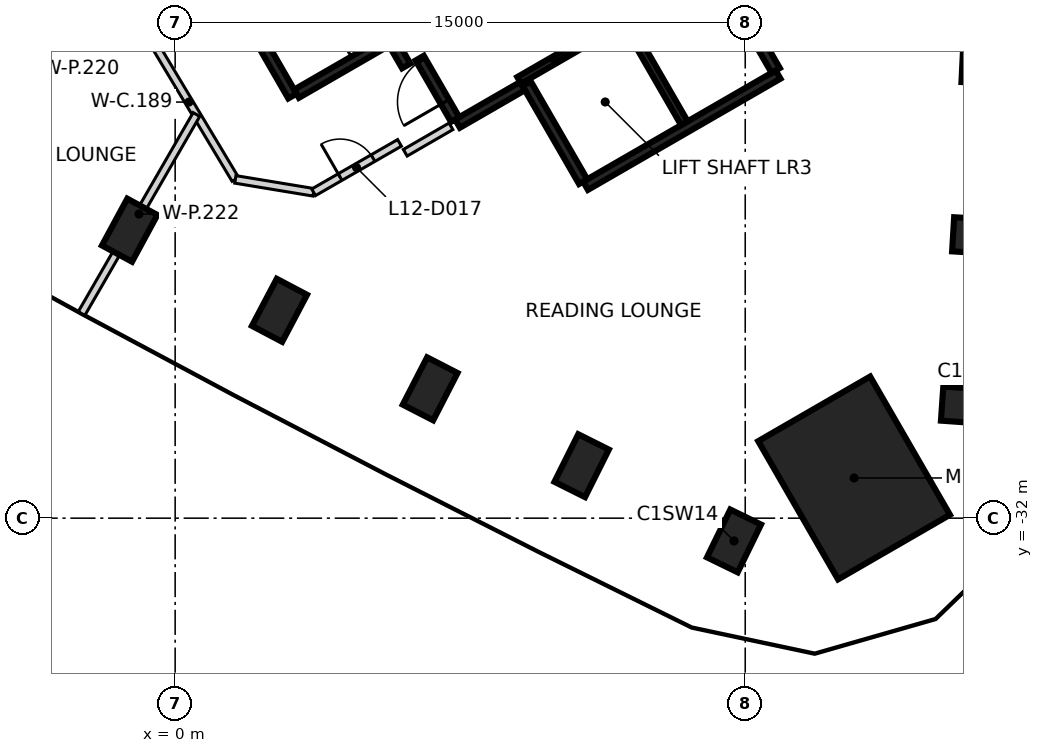
"""IFC4 building model, lengths in metres.
Left out: names, types, materials, properties, quantities, classifications, styles, units other than length and angle.
Written with IfcOpenShell. Run it as: python <this file> out.ifc"""

import sys

from ifc_helpers import new_model, si_unit, direction, frame, frame_2d, origin, origin_2d, place, context, subcontext, project, spatial, rectangle, extrude, element, fill, save


model = new_model("IFC4")
c1 = context("Model", 3, precision=1e-05, world=origin(), true_north=direction((0.0, 1.0)))
c2 = subcontext(c1, "Body", "Model", "MODEL_VIEW")
j1 = project(units=[si_unit("LENGTHUNIT", "METRE"), si_unit("PLANEANGLEUNIT", "RADIAN")], contexts=[c1])
p1 = place(None, origin())
s1 = spatial("IfcSite", under=j1, at=p1, CompositionType="ELEMENT")
p2 = place(p1, origin())
s2 = spatial("IfcBuilding", under=s1, at=p2, CompositionType="ELEMENT")
p3 = place(p2, frame((0.0, 0.0, 56.6)))
s3 = spatial("IfcBuildingStorey", under=s2, at=p3, CompositionType="ELEMENT", Elevation=56.6)
for number, where, z_axis, x_axis in (
    (1, (20.879, -29.034, -0.475), (0.0, 0.0, 1.0), (-0.998, 0.07, 0.0)),
    (2, (21.169, -24.573, -0.475), (0.0, 0.0, 1.0), (-0.998, 0.06, 0.0)),
    (3, (21.41, -20.109, -0.475), (0.0, 0.0, 1.0), (-0.999, 0.048, 0.0)),
    (4, (-1.197, -24.423, -0.475), (0.0, 0.0, 1.0), (0.476, 0.879, 0.0)),
    (5, (2.745, -26.531, -0.475), (0.0, 0.0, 1.0), (0.467, 0.884, 0.0)),
    (6, (6.71, -28.596, -0.475), (0.0, 0.0, 1.0), (0.458, 0.889, 0.0)),
    (7, (10.696, -30.619, -0.475), (0.0, 0.0, 1.0), (0.447, 0.894, 0.0)),
    (8, (14.705, -32.599, -0.475), (0.0, 0.0, 1.0), (0.438, 0.899, 0.0)),
):
    element("IfcColumn", number, at=place(p3, frame(where, z_axis=z_axis, x_axis=x_axis)), inside=s3, PredefinedType="COLUMN", context=c2, shape_type="SweptSolid", body=[
        extrude(rectangle(XDim=1.4, YDim=0.9, at=origin_2d()), origin(), (0.0, 0.0, 1.0), 3.6),
    ])
p4 = place(p3, frame((17.865, -30.942, -0.475), z_axis=(0.0, 0.0, 1.0), x_axis=(-0.5, 0.866025403784, 0.0)))
e9 = element("IfcColumn", 9, at=p4, inside=s3, PredefinedType="COLUMN", context=c2, shape_type="SweptSolid", body=[
    extrude(rectangle(XDim=4.2, YDim=3.4, at=origin_2d()), origin(), (0.0, 0.0, 1.0), 3.6),
])
p5 = place(p3, frame((15.865, -20.328, 0.0), z_axis=(0.0, 0.0, 1.0), x_axis=(-0.86602852612, -0.499994591916, 0.0)))
e10 = element("IfcWall", 10, at=p5, inside=s3, PredefinedType="SHEAR", context=c2, shape_type="SweptSolid", body=[
    extrude(rectangle(XDim=5.85, YDim=0.25, at=frame_2d((2.925, 0.0))), origin(), (0.0, 0.0, 1.0), 3.125),
])
for number, where, z_axis, x_axis in (
    (11, (14.315, -17.644, 0.0), (0.0, 0.0, 1.0), (0.5, -0.866, 0.0)),
    (12, (10.736, -23.145, 0.0), (0.0, 0.0, 1.0), (-0.5, 0.866, 0.0)),
):
    element("IfcWall", number, at=place(p3, frame(where, z_axis=z_axis, x_axis=x_axis)), inside=s3, PredefinedType="SHEAR", context=c2, shape_type="SweptSolid", body=[
        extrude(rectangle(XDim=2.974, YDim=0.25, at=frame_2d((1.487, 0.0))), origin(), (0.0, 0.0, 1.0), 3.125),
    ])
p6 = place(p3, frame((3.085, -20.894, 0.0), z_axis=(0.0, 0.0, 1.0), x_axis=(-0.499978833458, 0.866037623948, 0.0)))
e13 = element("IfcWall", 13, at=p6, inside=s3, PredefinedType="SHEAR", context=c2, shape_type="SweptSolid", body=[
    extrude(rectangle(XDim=3.05, YDim=0.25, at=frame_2d((1.525, 0.0))), origin(), (0.0, 0.0, 1.0), 3.125),
])
p7 = place(p3, frame((5.675, -19.399, 0.0), z_axis=(0.0, 0.0, 1.0), x_axis=(-0.866026637627, -0.499997862916, 0.0)))
e14 = element("IfcWall", 14, at=p7, inside=s3, PredefinedType="SHEAR", context=c2, shape_type="SweptSolid", body=[
    extrude(rectangle(XDim=2.865, YDim=0.25, at=frame_2d((1.432, 0.0))), origin(), (0.0, 0.0, 1.0), 3.125),
])
p8 = place(p3, frame((9.14, -20.631, 0.0), z_axis=(0.0, 0.0, 1.0), x_axis=(-0.866043531843, -0.499968599967, 0.0)))
e15 = element("IfcWall", 15, at=p8, inside=s3, PredefinedType="SHEAR", context=c2, shape_type="SweptSolid", body=[
    extrude(rectangle(XDim=1.975, YDim=0.25, at=frame_2d((0.987, 0.0))), origin(), (0.0, 0.0, 1.0), 3.125),
])
p9 = place(p3, frame((7.367, -21.51, 0.0), z_axis=(0.0, 0.0, 1.0), x_axis=(-0.499983108224, 0.866035156036, 0.0)))
e16 = element("IfcWall", 16, at=p9, inside=s3, PredefinedType="SHEAR", context=c2, shape_type="SweptSolid", body=[
    extrude(rectangle(XDim=1.865, YDim=0.25, at=frame_2d((0.932, 0.0))), origin(), (0.0, 0.0, 1.0), 3.125),
])
p10 = place(p9, frame((0.535, 0.0, 0.0)))
e17 = element("IfcOpeningElement", 17, at=p10, cuts=e16, PredefinedType="OPENING", context=c2, shape_type="SweptSolid", body=[
    extrude(rectangle(XDim=1.25, YDim=2.1, at=frame_2d((0.625, 1.05))), frame((0.0, 0.135, 0.0), z_axis=(0.0, -1.0, 0.0), x_axis=(1.0, 0.0, 0.0)), (0.0, 0.0, 1.0), 0.27),
])
p11 = place(p3, frame((6.08, -20.1, 0.0), z_axis=(0.0, 0.0, 1.0), x_axis=(-0.500051773299, 0.865995510393, 0.0)))
e18 = element("IfcWall", 18, at=p11, inside=s3, PredefinedType="SHEAR", context=c2, shape_type="SweptSolid", body=[
    extrude(rectangle(XDim=0.685, YDim=0.25, at=frame_2d((0.342, 0.0))), origin(), (0.0, 0.0, 1.0), 3.125),
])
p12 = place(p3, frame((9.052, -20.48, 0.0), z_axis=(0.0, 0.0, 1.0), x_axis=(0.866030299012, 0.499991521122, 0.0)))
e19 = element("IfcWall", 19, at=p12, inside=s3, PredefinedType="SHEAR", context=c2, shape_type="SweptSolid", body=[
    extrude(rectangle(XDim=6.1, YDim=0.2, at=frame_2d((3.05, 0.0))), origin(), (0.0, 0.0, 1.0), 3.125),
])
p13 = place(p12, frame((1.0, 0.0, 0.0)))
e20 = element("IfcOpeningElement", 20, at=p13, cuts=e19, PredefinedType="OPENING", context=c2, shape_type="SweptSolid", body=[
    extrude(rectangle(XDim=1.2, YDim=2.1, at=frame_2d((0.6, 1.05))), frame((0.0, 0.11, 0.0), z_axis=(0.0, -1.0, 0.0), x_axis=(1.0, 0.0, 0.0)), (0.0, 0.0, 1.0), 0.22),
])
p14 = place(p12, frame((4.05, 0.0, 0.0)))
e21 = element("IfcOpeningElement", 21, at=p14, cuts=e19, PredefinedType="OPENING", context=c2, shape_type="SweptSolid", body=[
    extrude(rectangle(XDim=1.2, YDim=2.1, at=frame_2d((0.6, 1.05))), frame((0.0, 0.11, 0.0), z_axis=(0.0, -1.0, 0.0), x_axis=(1.0, 0.0, 0.0)), (0.0, 0.0, 1.0), 0.22),
])
p15 = place(p3, frame((11.875, -18.967, 0.0), z_axis=(0.0, 0.0, 1.0), x_axis=(0.49998131003, -0.866036194175, 0.0)))
e22 = element("IfcWall", 22, at=p15, inside=s3, PredefinedType="SHEAR", context=c2, shape_type="SweptSolid", body=[
    extrude(rectangle(XDim=3.048, YDim=0.2, at=frame_2d((1.524, 0.0))), origin(), (0.0, 0.0, 1.0), 3.125),
])
p16 = place(p3, frame((-0.858, -19.017, 0.0), z_axis=(0.0, 0.0, 1.0), x_axis=(0.514647068805, -0.857402119528, 0.0)))
e23 = element("IfcWall", 23, at=p16, inside=s3, PredefinedType="PARTITIONING", context=c2, shape_type="SweptSolid", body=[
    extrude(rectangle(XDim=4.745, YDim=0.2, at=frame_2d((2.373, 0.0))), origin(), (0.0, 0.0, 1.0), 3.125),
])
p17 = place(p3, frame((1.584, -23.086, 0.0), z_axis=(0.0, 0.0, 1.0), x_axis=(0.986633159246, -0.162957077405, 0.0)))
e24 = element("IfcWall", 24, at=p17, inside=s3, PredefinedType="PARTITIONING", context=c2, shape_type="SweptSolid", body=[
    extrude(rectangle(XDim=2.087, YDim=0.2, at=frame_2d((1.043, 0.0))), origin(), (0.0, 0.0, 1.0), 3.125),
])
p18 = place(p3, frame((3.643, -23.426, 0.0), z_axis=(0.0, 0.0, 1.0), x_axis=(0.866654350985, 0.498909045738, 0.0)))
e25 = element("IfcWall", 25, at=p18, inside=s3, PredefinedType="PARTITIONING", context=c2, shape_type="SweptSolid", body=[
    extrude(rectangle(XDim=2.608, YDim=0.2, at=frame_2d((1.304, 0.0))), origin(), (0.0, 0.0, 1.0), 3.125),
])
p19 = place(p18, frame((0.804, 0.0, 0.0)))
e26 = element("IfcOpeningElement", 26, at=p19, cuts=e25, PredefinedType="OPENING", context=c2, shape_type="SweptSolid", body=[
    extrude(rectangle(XDim=1.0, YDim=2.1, at=frame_2d((0.5, 1.05))), frame((0.0, 0.11, 0.0), z_axis=(0.0, -1.0, 0.0), x_axis=(1.0, 0.0, 0.0)), (0.0, 0.0, 1.0), 0.22),
])
p20 = place(p3, frame((6.054, -22.385, 0.0), z_axis=(0.0, 0.0, 1.0), x_axis=(0.86593101922, 0.500163443238, 0.0)))
e27 = element("IfcWall", 27, at=p20, inside=s3, PredefinedType="PARTITIONING", context=c2, shape_type="SweptSolid", body=[
    extrude(rectangle(XDim=1.39, YDim=0.2, at=frame_2d((0.695, 0.0))), origin(), (0.0, 0.0, 1.0), 3.125),
])
p21 = place(p3, frame((-10.276, -22.271, 0.0), z_axis=(0.0, 0.0, 1.0), x_axis=(0.49999372146, 0.866029028671, 0.0)))
e28 = element("IfcWall", 28, at=p21, inside=s3, PredefinedType="PARTITIONING", context=c2, shape_type="SweptSolid", body=[
    extrude(rectangle(XDim=17.425, YDim=0.2, at=frame_2d((8.712, 0.0))), origin(), (0.0, 0.0, 1.0), 3.125),
])
p22 = place(p3, frame((-6.381, -24.464, 0.0), z_axis=(0.0, 0.0, 1.0), x_axis=(0.500007577232, 0.866021029023, 0.0)))
e29 = element("IfcWall", 29, at=p22, inside=s3, PredefinedType="PARTITIONING", context=c2, shape_type="SweptSolid", body=[
    extrude(rectangle(XDim=9.883, YDim=0.2, at=frame_2d((4.941, 0.0))), origin(), (0.0, 0.0, 1.0), 3.125),
])
p23 = place(p3, frame((-2.462, -26.615, 0.0), z_axis=(0.0, 0.0, 1.0), x_axis=(0.49992636536, 0.86606791259, 0.0)))
e30 = element("IfcWall", 30, at=p23, inside=s3, PredefinedType="PARTITIONING", context=c2, shape_type="SweptSolid", body=[
    extrude(rectangle(XDim=6.046, YDim=0.2, at=frame_2d((3.023, 0.0))), origin(), (0.0, 0.0, 1.0), 3.125),
])
p24 = place(p13, origin())
e31 = element("IfcDoor", 31, at=p24, inside=s3, OperationType="DOUBLE_DOOR_SLIDING", PredefinedType="DOOR", context=c2, shape_type="SweptSolid", body=[
    extrude(rectangle(XDim=1.2, YDim=2.1, at=frame_2d((0.6, 1.05))), frame((0.0, 0.025, 0.0), z_axis=(0.0, -1.0, 0.0), x_axis=(1.0, 0.0, 0.0)), (0.0, 0.0, 1.0), 0.05),
])
fill(e20, e31)
p25 = place(p10, origin())
e32 = element("IfcDoor", 32, at=p25, inside=s3, OperationType="SINGLE_SWING_LEFT", PredefinedType="DOOR", context=c2, shape_type="SweptSolid", body=[
    extrude(rectangle(XDim=1.25, YDim=2.1, at=frame_2d((0.625, 1.05))), frame((0.0, 0.025, 0.0), z_axis=(0.0, -1.0, 0.0), x_axis=(1.0, 0.0, 0.0)), (0.0, 0.0, 1.0), 0.05),
])
fill(e17, e32)
p26 = place(p19, frame((1.0, 0.0, 0.0), z_axis=(0.0, 0.0, 1.0), x_axis=(-1.0, 0.0, 0.0)))
e33 = element("IfcDoor", 33, at=p26, inside=s3, OperationType="SINGLE_SWING_LEFT", PredefinedType="DOOR", context=c2, shape_type="SweptSolid", body=[
    extrude(rectangle(XDim=1.0, YDim=2.1, at=frame_2d((0.5, 1.05))), frame((0.0, 0.025, 0.0), z_axis=(0.0, -1.0, 0.0), x_axis=(1.0, 0.0, 0.0)), (0.0, 0.0, 1.0), 0.05),
])
fill(e26, e33)
save(model, sys.argv[1])
